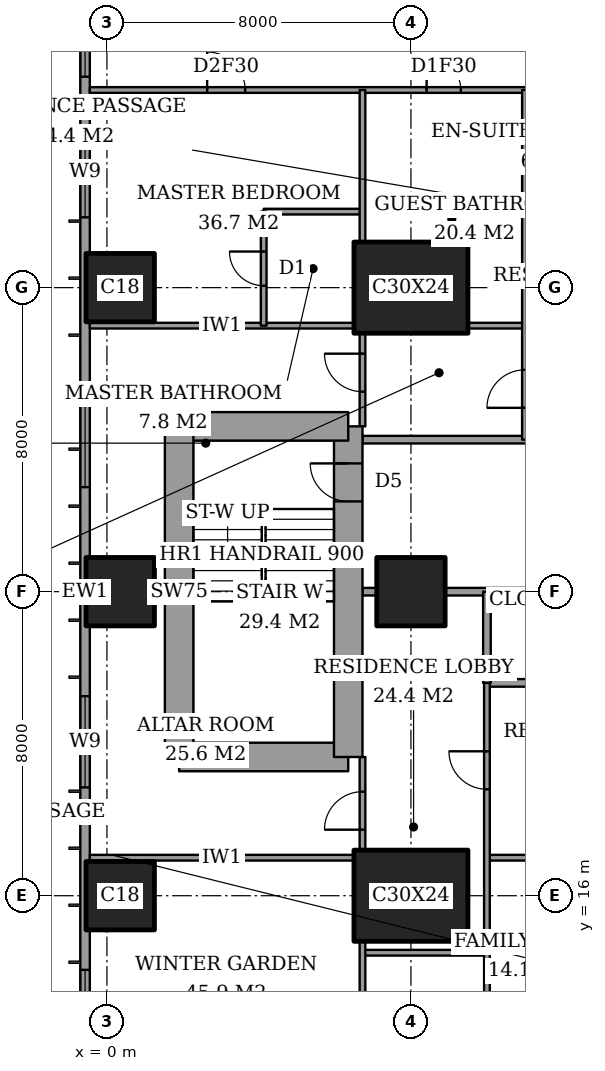
"""IFC4 building model, lengths in metres.
Left out: names, types, materials, properties, quantities, classifications, styles, units other than length and angle.
Written with IfcOpenShell. Run it as: python <this file> out.ifc"""

import sys

from ifc_helpers import new_model, si_unit, direction, frame, frame_2d, origin, origin_2d, place, context, subcontext, project, spatial, rectangle, extrude, element, fill, save


model = new_model("IFC4")
c1 = context("Model", 3, precision=1e-05, world=origin(), true_north=direction((0.0, 1.0)))
c2 = subcontext(c1, "Body", "Model", "MODEL_VIEW")
j1 = project(units=[si_unit("LENGTHUNIT", "METRE"), si_unit("PLANEANGLEUNIT", "RADIAN")], contexts=[c1])
p1 = place(None, origin())
s1 = spatial("IfcSite", under=j1, at=p1, CompositionType="ELEMENT")
p2 = place(p1, origin())
s2 = spatial("IfcBuilding", under=s1, at=p2, CompositionType="ELEMENT")
p3 = place(p2, frame((0.0, 0.0, 203.8)))
s3 = spatial("IfcBuildingStorey", under=s2, at=p3, CompositionType="ELEMENT", Elevation=203.8)
for number, where, z_axis, x_axis in (
    (1, (0.35, 16.0, 0.0), (0.0, 0.0, 1.0), (1.0, 0.0, 0.0)),
    (2, (0.35, 24.0, 0.0), (0.0, 0.0, 1.0), (1.0, 0.0, 0.0)),
    (3, (0.35, 32.0, 0.0), (0.0, 0.0, 1.0), (1.0, 0.0, 0.0)),
):
    element("IfcColumn", number, at=place(p3, frame(where, z_axis=z_axis, x_axis=x_axis)), inside=s3, PredefinedType="COLUMN", context=c2, shape_type="SweptSolid", body=[
        extrude(rectangle(XDim=1.8, YDim=1.8, at=origin_2d()), origin(), (0.0, 0.0, 1.0), 3.6),
    ])
p4 = place(p3, frame((8.0, 16.0, 0.0), z_axis=(0.0, 0.0, 1.0), x_axis=(1.0, 0.0, 0.0)))
e4 = element("IfcColumn", 4, at=p4, inside=s3, PredefinedType="COLUMN", context=c2, shape_type="SweptSolid", body=[
    extrude(rectangle(XDim=3.0, YDim=2.4, at=origin_2d()), origin(), (0.0, 0.0, 1.0), 3.6),
])
p5 = place(p3, frame((8.0, 24.0, 0.0), z_axis=(0.0, 0.0, 1.0), x_axis=(1.0, 0.0, 0.0)))
e5 = element("IfcColumn", 5, at=p5, inside=s3, PredefinedType="COLUMN", context=c2, shape_type="SweptSolid", body=[
    extrude(rectangle(XDim=1.8, YDim=1.8, at=origin_2d()), origin(), (0.0, 0.0, 1.0), 3.6),
])
p6 = place(p3, frame((8.0, 32.0, 0.0), z_axis=(0.0, 0.0, 1.0), x_axis=(1.0, 0.0, 0.0)))
e6 = element("IfcColumn", 6, at=p6, inside=s3, PredefinedType="COLUMN", context=c2, shape_type="SweptSolid", body=[
    extrude(rectangle(XDim=3.0, YDim=2.4, at=origin_2d()), origin(), (0.0, 0.0, 1.0), 3.6),
])
p7 = place(p3, frame((1.9, 19.65, 0.0), z_axis=(0.0, 0.0, 1.0), x_axis=(1.0, 0.0, 0.0)))
e7 = element("IfcWall", 7, at=p7, inside=s3, PredefinedType="SHEAR", context=c2, shape_type="SweptSolid", body=[
    extrude(rectangle(XDim=4.45, YDim=0.75, at=frame_2d((2.225, 0.0))), origin(), (0.0, 0.0, 1.0), 3.6),
])
p8 = place(p3, frame((6.35, 19.65, 0.0), z_axis=(0.0, 0.0, 1.0), x_axis=(0.0, 1.0, 0.0)))
e8 = element("IfcWall", 8, at=p8, inside=s3, PredefinedType="SHEAR", context=c2, shape_type="SweptSolid", body=[
    extrude(rectangle(XDim=8.7, YDim=0.75, at=frame_2d((4.35, 0.0))), origin(), (0.0, 0.0, 1.0), 3.6),
])
p9 = place(p8, frame((6.725, 0.0, 0.0)))
e9 = element("IfcOpeningElement", 9, at=p9, cuts=e8, PredefinedType="OPENING", context=c2, shape_type="SweptSolid", body=[
    extrude(rectangle(XDim=1.0, YDim=2.1, at=frame_2d((0.5, 1.05))), frame((0.0, 0.385, 0.0), z_axis=(0.0, -1.0, 0.0), x_axis=(1.0, 0.0, 0.0)), (0.0, 0.0, 1.0), 0.77),
])
p10 = place(p3, frame((6.35, 28.35, 0.0), z_axis=(0.0, 0.0, 1.0), x_axis=(-1.0, 0.0, 0.0)))
e10 = element("IfcWall", 10, at=p10, inside=s3, PredefinedType="SHEAR", context=c2, shape_type="SweptSolid", body=[
    extrude(rectangle(XDim=4.45, YDim=0.75, at=frame_2d((2.225, 0.0))), origin(), (0.0, 0.0, 1.0), 3.6),
])
p11 = place(p3, frame((1.9, 28.35, 0.0), z_axis=(0.0, 0.0, 1.0), x_axis=(0.0, -1.0, 0.0)))
e11 = element("IfcWall", 11, at=p11, inside=s3, PredefinedType="SHEAR", context=c2, shape_type="SweptSolid", body=[
    extrude(rectangle(XDim=8.7, YDim=0.75, at=frame_2d((4.35, 0.0))), origin(), (0.0, 0.0, 1.0), 3.6),
])
p12 = place(p3, frame((-0.575, 44.825, 0.0), z_axis=(0.0, 0.0, 1.0), x_axis=(0.0, -1.0, 0.0)))
e12 = element("IfcWall", 12, at=p12, inside=s3, PredefinedType="SOLIDWALL", context=c2, shape_type="SweptSolid", body=[
    extrude(rectangle(XDim=41.65, YDim=0.25, at=frame_2d((20.825, 0.0))), origin(), (0.0, 0.0, 1.0), 3.6),
])
p13 = place(p12, frame((0.825, 0.0, 0.2)))
e13 = element("IfcOpeningElement", 13, at=p13, cuts=e12, PredefinedType="OPENING", context=c2, shape_type="SweptSolid", body=[
    extrude(rectangle(XDim=2.4, YDim=2.4, at=frame_2d((1.2, 1.2))), frame((0.0, 0.135, 0.0), z_axis=(0.0, -1.0, 0.0), x_axis=(1.0, 0.0, 0.0)), (0.0, 0.0, 1.0), 0.27),
])
p14 = place(p12, frame((6.075, 0.0, 0.2)))
e14 = element("IfcOpeningElement", 14, at=p14, cuts=e12, PredefinedType="OPENING", context=c2, shape_type="SweptSolid", body=[
    extrude(rectangle(XDim=1.2, YDim=2.4, at=frame_2d((0.6, 1.2))), frame((0.0, 0.135, 0.0), z_axis=(0.0, -1.0, 0.0), x_axis=(1.0, 0.0, 0.0)), (0.0, 0.0, 1.0), 0.27),
])
p15 = place(p12, frame((8.575, 0.0, 0.2)))
e15 = element("IfcOpeningElement", 15, at=p15, cuts=e12, PredefinedType="OPENING", context=c2, shape_type="SweptSolid", body=[
    extrude(rectangle(XDim=2.4, YDim=2.4, at=frame_2d((1.2, 1.2))), frame((0.0, 0.135, 0.0), z_axis=(0.0, -1.0, 0.0), x_axis=(1.0, 0.0, 0.0)), (0.0, 0.0, 1.0), 0.27),
])
p16 = place(p12, frame((15.675, 0.0, 0.2)))
e16 = element("IfcOpeningElement", 16, at=p16, cuts=e12, PredefinedType="OPENING", context=c2, shape_type="SweptSolid", body=[
    extrude(rectangle(XDim=2.4, YDim=2.4, at=frame_2d((1.2, 1.2))), frame((0.0, 0.135, 0.0), z_axis=(0.0, -1.0, 0.0), x_axis=(1.0, 0.0, 0.0)), (0.0, 0.0, 1.0), 0.27),
])
p17 = place(p12, frame((23.575, 0.0, 0.2)))
e17 = element("IfcOpeningElement", 17, at=p17, cuts=e12, PredefinedType="OPENING", context=c2, shape_type="SweptSolid", body=[
    extrude(rectangle(XDim=2.4, YDim=2.4, at=frame_2d((1.2, 1.2))), frame((0.0, 0.135, 0.0), z_axis=(0.0, -1.0, 0.0), x_axis=(1.0, 0.0, 0.0)), (0.0, 0.0, 1.0), 0.27),
])
p18 = place(p12, frame((30.775, 0.0, 0.2)))
e18 = element("IfcOpeningElement", 18, at=p18, cuts=e12, PredefinedType="OPENING", context=c2, shape_type="SweptSolid", body=[
    extrude(rectangle(XDim=2.4, YDim=2.4, at=frame_2d((1.2, 1.2))), frame((0.0, 0.135, 0.0), z_axis=(0.0, -1.0, 0.0), x_axis=(1.0, 0.0, 0.0)), (0.0, 0.0, 1.0), 0.27),
])
p19 = place(p12, frame((34.55, 0.0, 0.2)))
e19 = element("IfcOpeningElement", 19, at=p19, cuts=e12, PredefinedType="OPENING", context=c2, shape_type="SweptSolid", body=[
    extrude(rectangle(XDim=1.2, YDim=2.4, at=frame_2d((0.6, 1.2))), frame((0.0, 0.135, 0.0), z_axis=(0.0, -1.0, 0.0), x_axis=(1.0, 0.0, 0.0)), (0.0, 0.0, 1.0), 0.27),
])
p20 = place(p12, frame((38.425, 0.0, 0.2)))
e20 = element("IfcOpeningElement", 20, at=p20, cuts=e12, PredefinedType="OPENING", context=c2, shape_type="SweptSolid", body=[
    extrude(rectangle(XDim=2.4, YDim=2.4, at=frame_2d((1.2, 1.2))), frame((0.0, 0.135, 0.0), z_axis=(0.0, -1.0, 0.0), x_axis=(1.0, 0.0, 0.0)), (0.0, 0.0, 1.0), 0.27),
])
p21 = place(p3, frame((6.725, 14.5, 0.0), z_axis=(0.0, 0.0, 1.0), x_axis=(1.0, 0.0, 0.0)))
e21 = element("IfcWall", 21, at=p21, inside=s3, PredefinedType="PARTITIONING", context=c2, shape_type="SweptSolid", body=[
    extrude(rectangle(XDim=3.275, YDim=0.15, at=frame_2d((1.637, 0.0))), origin(), (0.0, 0.0, 1.0), 3.35),
])
p22 = place(p3, frame((-0.45, 17.0, 0.0), z_axis=(0.0, 0.0, 1.0), x_axis=(1.0, 0.0, 0.0)))
e22 = element("IfcWall", 22, at=p22, inside=s3, PredefinedType="PARTITIONING", context=c2, shape_type="SweptSolid", body=[
    extrude(rectangle(XDim=6.95, YDim=0.15, at=frame_2d((3.475, 0.0))), origin(), (0.0, 0.0, 1.0), 3.35),
])
p23 = place(p3, frame((10.0, 17.0, 0.0), z_axis=(0.0, 0.0, 1.0), x_axis=(1.0, 0.0, 0.0)))
e23 = element("IfcWall", 23, at=p23, inside=s3, PredefinedType="PARTITIONING", context=c2, shape_type="SweptSolid", body=[
    extrude(rectangle(XDim=4.4, YDim=0.15, at=frame_2d((2.2, 0.0))), origin(), (0.0, 0.0, 1.0), 3.35),
])
p24 = place(p23, frame((2.8, 0.0, 0.0)))
e24 = element("IfcOpeningElement", 24, at=p24, cuts=e23, PredefinedType="OPENING", context=c2, shape_type="SweptSolid", body=[
    extrude(rectangle(XDim=1.0, YDim=2.1, at=frame_2d((0.5, 1.05))), frame((0.0, 0.085, 0.0), z_axis=(0.0, -1.0, 0.0), x_axis=(1.0, 0.0, 0.0)), (0.0, 0.0, 1.0), 0.17),
])
p25 = place(p3, frame((10.0, 21.6, 0.0), z_axis=(0.0, 0.0, 1.0), x_axis=(1.0, 0.0, 0.0)))
e25 = element("IfcWall", 25, at=p25, inside=s3, PredefinedType="PARTITIONING", context=c2, shape_type="SweptSolid", body=[
    extrude(rectangle(XDim=4.8, YDim=0.2, at=frame_2d((2.4, 0.0))), origin(), (0.0, 0.0, 1.0), 3.35),
])
p26 = place(p25, frame((1.95, 0.0, 0.0)))
e26 = element("IfcOpeningElement", 26, at=p26, cuts=e25, PredefinedType="OPENING", context=c2, shape_type="SweptSolid", body=[
    extrude(rectangle(XDim=0.9, YDim=2.1, at=frame_2d((0.45, 1.05))), frame((0.0, 0.11, 0.0), z_axis=(0.0, -1.0, 0.0), x_axis=(1.0, 0.0, 0.0)), (0.0, 0.0, 1.0), 0.22),
])
p27 = place(p3, frame((6.725, 24.0, 0.0), z_axis=(0.0, 0.0, 1.0), x_axis=(1.0, 0.0, 0.0)))
e27 = element("IfcWall", 27, at=p27, inside=s3, PredefinedType="PARTITIONING", context=c2, shape_type="SweptSolid", body=[
    extrude(rectangle(XDim=0.375, YDim=0.2, at=frame_2d((0.188, 0.0))), origin(), (0.0, 0.0, 1.0), 3.35),
])
p28 = place(p3, frame((8.9, 24.0, 0.0), z_axis=(0.0, 0.0, 1.0), x_axis=(1.0, 0.0, 0.0)))
e28 = element("IfcWall", 28, at=p28, inside=s3, PredefinedType="PARTITIONING", context=c2, shape_type="SweptSolid", body=[
    extrude(rectangle(XDim=6.2, YDim=0.2, at=frame_2d((3.1, 0.0))), origin(), (0.0, 0.0, 1.0), 3.35),
])
p29 = place(p3, frame((6.725, 28.0, 0.0), z_axis=(0.0, 0.0, 1.0), x_axis=(1.0, 0.0, 0.0)))
e29 = element("IfcWall", 29, at=p29, inside=s3, PredefinedType="PARTITIONING", context=c2, shape_type="SweptSolid", body=[
    extrude(rectangle(XDim=17.275, YDim=0.2, at=frame_2d((8.637, 0.0))), origin(), (0.0, 0.0, 1.0), 3.35),
])
p30 = place(p29, frame((7.175, 0.0, 0.0)))
e30 = element("IfcOpeningElement", 30, at=p30, cuts=e29, PredefinedType="OPENING", context=c2, shape_type="SweptSolid", body=[
    extrude(rectangle(XDim=1.2, YDim=2.4, at=frame_2d((0.6, 1.2))), frame((0.0, 0.11, 0.0), z_axis=(0.0, -1.0, 0.0), x_axis=(1.0, 0.0, 0.0)), (0.0, 0.0, 1.0), 0.22),
])
p31 = place(p3, frame((-0.45, 31.0, 0.0), z_axis=(0.0, 0.0, 1.0), x_axis=(1.0, 0.0, 0.0)))
e31 = element("IfcWall", 31, at=p31, inside=s3, PredefinedType="PARTITIONING", context=c2, shape_type="SweptSolid", body=[
    extrude(rectangle(XDim=6.95, YDim=0.15, at=frame_2d((3.475, 0.0))), origin(), (0.0, 0.0, 1.0), 3.35),
])
p32 = place(p3, frame((9.5, 31.0, 0.0), z_axis=(0.0, 0.0, 1.0), x_axis=(1.0, 0.0, 0.0)))
e32 = element("IfcWall", 32, at=p32, inside=s3, PredefinedType="PARTITIONING", context=c2, shape_type="SweptSolid", body=[
    extrude(rectangle(XDim=1.5, YDim=0.15, at=frame_2d((0.75, 0.0))), origin(), (0.0, 0.0, 1.0), 3.35),
])
p33 = place(p3, frame((4.125, 34.0, 0.0), z_axis=(0.0, 0.0, 1.0), x_axis=(1.0, 0.0, 0.0)))
e33 = element("IfcWall", 33, at=p33, inside=s3, PredefinedType="PARTITIONING", context=c2, shape_type="SweptSolid", body=[
    extrude(rectangle(XDim=2.6, YDim=0.15, at=frame_2d((1.3, 0.0))), origin(), (0.0, 0.0, 1.0), 3.35),
])
p34 = place(p3, frame((-0.45, 37.2, 0.0), z_axis=(0.0, 0.0, 1.0), x_axis=(1.0, 0.0, 0.0)))
e34 = element("IfcWall", 34, at=p34, inside=s3, PredefinedType="PARTITIONING", context=c2, shape_type="SweptSolid", body=[
    extrude(rectangle(XDim=25.011, YDim=0.15, at=frame_2d((12.505, 0.0))), origin(), (0.0, 0.0, 1.0), 3.35),
])
p35 = place(p34, frame((12.05, 0.0, 0.0)))
e35 = element("IfcOpeningElement", 35, at=p35, cuts=e34, PredefinedType="OPENING", context=c2, shape_type="SweptSolid", body=[
    extrude(rectangle(XDim=1.0, YDim=2.1, at=frame_2d((0.5, 1.05))), frame((0.0, 0.085, 0.0), z_axis=(0.0, -1.0, 0.0), x_axis=(1.0, 0.0, 0.0)), (0.0, 0.0, 1.0), 0.17),
])
p36 = place(p34, frame((3.087, 0.0, 0.0)))
e36 = element("IfcOpeningElement", 36, at=p36, cuts=e34, PredefinedType="OPENING", context=c2, shape_type="SweptSolid", body=[
    extrude(rectangle(XDim=1.0, YDim=2.1, at=frame_2d((0.5, 1.05))), frame((0.0, 0.085, 0.0), z_axis=(0.0, -1.0, 0.0), x_axis=(1.0, 0.0, 0.0)), (0.0, 0.0, 1.0), 0.17),
])
p37 = place(p34, frame((8.863, 0.0, 0.0)))
e37 = element("IfcOpeningElement", 37, at=p37, cuts=e34, PredefinedType="OPENING", context=c2, shape_type="SweptSolid", body=[
    extrude(rectangle(XDim=0.9, YDim=2.1, at=frame_2d((0.45, 1.05))), frame((0.0, 0.085, 0.0), z_axis=(0.0, -1.0, 0.0), x_axis=(1.0, 0.0, 0.0)), (0.0, 0.0, 1.0), 0.17),
])
p38 = place(p34, frame((15.55, 0.0, 0.0)))
e38 = element("IfcOpeningElement", 38, at=p38, cuts=e34, PredefinedType="OPENING", context=c2, shape_type="SweptSolid", body=[
    extrude(rectangle(XDim=1.0, YDim=2.1, at=frame_2d((0.5, 1.05))), frame((0.0, 0.085, 0.0), z_axis=(0.0, -1.0, 0.0), x_axis=(1.0, 0.0, 0.0)), (0.0, 0.0, 1.0), 0.17),
])
p39 = place(p34, frame((21.175, 0.0, 0.0)))
e39 = element("IfcOpeningElement", 39, at=p39, cuts=e34, PredefinedType="OPENING", context=c2, shape_type="SweptSolid", body=[
    extrude(rectangle(XDim=1.0, YDim=2.1, at=frame_2d((0.5, 1.05))), frame((0.0, 0.085, 0.0), z_axis=(0.0, -1.0, 0.0), x_axis=(1.0, 0.0, 0.0)), (0.0, 0.0, 1.0), 0.17),
])
p40 = place(p3, frame((4.125, 31.0, 0.0), z_axis=(0.0, 0.0, 1.0), x_axis=(0.0, 1.0, 0.0)))
e40 = element("IfcWall", 40, at=p40, inside=s3, PredefinedType="PARTITIONING", context=c2, shape_type="SweptSolid", body=[
    extrude(rectangle(XDim=3.0, YDim=0.15, at=frame_2d((1.5, 0.0))), origin(), (0.0, 0.0, 1.0), 3.35),
])
p41 = place(p40, frame((1.05, 0.0, 0.0)))
e41 = element("IfcOpeningElement", 41, at=p41, cuts=e40, PredefinedType="OPENING", context=c2, shape_type="SweptSolid", body=[
    extrude(rectangle(XDim=0.9, YDim=2.1, at=frame_2d((0.45, 1.05))), frame((0.0, 0.085, 0.0), z_axis=(0.0, -1.0, 0.0), x_axis=(1.0, 0.0, 0.0)), (0.0, 0.0, 1.0), 0.17),
])
p42 = place(p3, frame((6.725, 10.6, 0.0), z_axis=(0.0, 0.0, 1.0), x_axis=(0.0, 1.0, 0.0)))
e42 = element("IfcWall", 42, at=p42, inside=s3, PredefinedType="PARTITIONING", context=c2, shape_type="SweptSolid", body=[
    extrude(rectangle(XDim=4.2, YDim=0.15, at=frame_2d((2.1, 0.0))), origin(), (0.0, 0.0, 1.0), 3.35),
])
p43 = place(p3, frame((6.725, 17.2, 0.0), z_axis=(0.0, 0.0, 1.0), x_axis=(0.0, 1.0, 0.0)))
e43 = element("IfcWall", 43, at=p43, inside=s3, PredefinedType="PARTITIONING", context=c2, shape_type="SweptSolid", body=[
    extrude(rectangle(XDim=2.45, YDim=0.15, at=frame_2d((1.225, 0.0))), origin(), (0.0, 0.0, 1.0), 3.35),
])
p44 = place(p43, frame((0.538, 0.0, 0.0)))
e44 = element("IfcOpeningElement", 44, at=p44, cuts=e43, PredefinedType="OPENING", context=c2, shape_type="SweptSolid", body=[
    extrude(rectangle(XDim=1.0, YDim=2.1, at=frame_2d((0.5, 1.05))), frame((0.0, 0.085, 0.0), z_axis=(0.0, -1.0, 0.0), x_axis=(1.0, 0.0, 0.0)), (0.0, 0.0, 1.0), 0.17),
])
p45 = place(p3, frame((6.725, 28.35, 0.0), z_axis=(0.0, 0.0, 1.0), x_axis=(0.0, 1.0, 0.0)))
e45 = element("IfcWall", 45, at=p45, inside=s3, PredefinedType="PARTITIONING", context=c2, shape_type="SweptSolid", body=[
    extrude(rectangle(XDim=2.45, YDim=0.15, at=frame_2d((1.225, 0.0))), origin(), (0.0, 0.0, 1.0), 3.35),
])
p46 = place(p45, frame((0.913, 0.0, 0.0)))
e46 = element("IfcOpeningElement", 46, at=p46, cuts=e45, PredefinedType="OPENING", context=c2, shape_type="SweptSolid", body=[
    extrude(rectangle(XDim=1.0, YDim=2.1, at=frame_2d((0.5, 1.05))), frame((0.0, 0.085, 0.0), z_axis=(0.0, -1.0, 0.0), x_axis=(1.0, 0.0, 0.0)), (0.0, 0.0, 1.0), 0.17),
])
p47 = place(p3, frame((6.725, 33.2, 0.0), z_axis=(0.0, 0.0, 1.0), x_axis=(0.0, 1.0, 0.0)))
e47 = element("IfcWall", 47, at=p47, inside=s3, PredefinedType="PARTITIONING", context=c2, shape_type="SweptSolid", body=[
    extrude(rectangle(XDim=4.0, YDim=0.15, at=frame_2d((2.0, 0.0))), origin(), (0.0, 0.0, 1.0), 3.35),
])
p48 = place(p3, frame((10.0, 21.6, 0.0), z_axis=(0.0, 0.0, 1.0), x_axis=(0.0, 1.0, 0.0)))
e48 = element("IfcWall", 48, at=p48, inside=s3, PredefinedType="PARTITIONING", context=c2, shape_type="SweptSolid", body=[
    extrude(rectangle(XDim=2.4, YDim=0.2, at=frame_2d((1.2, 0.0))), origin(), (0.0, 0.0, 1.0), 3.35),
])
p49 = place(p3, frame((10.0, 10.6, 0.0), z_axis=(0.0, 0.0, 1.0), x_axis=(0.0, 1.0, 0.0)))
e49 = element("IfcWall", 49, at=p49, inside=s3, PredefinedType="PARTITIONING", context=c2, shape_type="SweptSolid", body=[
    extrude(rectangle(XDim=11.0, YDim=0.15, at=frame_2d((5.5, 0.0))), origin(), (0.0, 0.0, 1.0), 3.35),
])
p50 = place(p49, frame((8.2, 0.0, 0.0)))
e50 = element("IfcOpeningElement", 50, at=p50, cuts=e49, PredefinedType="OPENING", context=c2, shape_type="SweptSolid", body=[
    extrude(rectangle(XDim=1.0, YDim=2.1, at=frame_2d((0.5, 1.05))), frame((0.0, 0.085, 0.0), z_axis=(0.0, -1.0, 0.0), x_axis=(1.0, 0.0, 0.0)), (0.0, 0.0, 1.0), 0.17),
])
p51 = place(p3, frame((11.0, 28.0, 0.0), z_axis=(0.0, 0.0, 1.0), x_axis=(0.0, 1.0, 0.0)))
e51 = element("IfcWall", 51, at=p51, inside=s3, PredefinedType="PARTITIONING", context=c2, shape_type="SweptSolid", body=[
    extrude(rectangle(XDim=9.2, YDim=0.15, at=frame_2d((4.6, 0.0))), origin(), (0.0, 0.0, 1.0), 3.35),
])
p52 = place(p51, frame((0.837, 0.0, 0.0)))
e52 = element("IfcOpeningElement", 52, at=p52, cuts=e51, PredefinedType="OPENING", context=c2, shape_type="SweptSolid", body=[
    extrude(rectangle(XDim=1.0, YDim=2.1, at=frame_2d((0.5, 1.05))), frame((0.0, 0.085, 0.0), z_axis=(0.0, -1.0, 0.0), x_axis=(1.0, 0.0, 0.0)), (0.0, 0.0, 1.0), 0.17),
])
p53 = place(p14, origin())
e53 = element("IfcWindow", 53, at=p53, inside=s3, PartitioningType="SINGLE_PANEL", PredefinedType="WINDOW", context=c2, shape_type="SweptSolid", body=[
    extrude(rectangle(XDim=1.2, YDim=2.4, at=frame_2d((0.6, 1.2))), frame((0.0, 0.03, 0.0), z_axis=(0.0, -1.0, 0.0), x_axis=(1.0, 0.0, 0.0)), (0.0, 0.0, 1.0), 0.06),
])
fill(e14, e53)
p54 = place(p15, origin())
e54 = element("IfcWindow", 54, at=p54, inside=s3, PartitioningType="SINGLE_PANEL", PredefinedType="WINDOW", context=c2, shape_type="SweptSolid", body=[
    extrude(rectangle(XDim=2.4, YDim=2.4, at=frame_2d((1.2, 1.2))), frame((0.0, 0.03, 0.0), z_axis=(0.0, -1.0, 0.0), x_axis=(1.0, 0.0, 0.0)), (0.0, 0.0, 1.0), 0.06),
])
fill(e15, e54)
p55 = place(p16, origin())
e55 = element("IfcWindow", 55, at=p55, inside=s3, PartitioningType="SINGLE_PANEL", PredefinedType="WINDOW", context=c2, shape_type="SweptSolid", body=[
    extrude(rectangle(XDim=2.4, YDim=2.4, at=frame_2d((1.2, 1.2))), frame((0.0, 0.03, 0.0), z_axis=(0.0, -1.0, 0.0), x_axis=(1.0, 0.0, 0.0)), (0.0, 0.0, 1.0), 0.06),
])
fill(e16, e55)
p56 = place(p17, origin())
e56 = element("IfcWindow", 56, at=p56, inside=s3, PartitioningType="SINGLE_PANEL", PredefinedType="WINDOW", context=c2, shape_type="SweptSolid", body=[
    extrude(rectangle(XDim=2.4, YDim=2.4, at=frame_2d((1.2, 1.2))), frame((0.0, 0.03, 0.0), z_axis=(0.0, -1.0, 0.0), x_axis=(1.0, 0.0, 0.0)), (0.0, 0.0, 1.0), 0.06),
])
fill(e17, e56)
p57 = place(p18, origin())
e57 = element("IfcWindow", 57, at=p57, inside=s3, PartitioningType="SINGLE_PANEL", PredefinedType="WINDOW", context=c2, shape_type="SweptSolid", body=[
    extrude(rectangle(XDim=2.4, YDim=2.4, at=frame_2d((1.2, 1.2))), frame((0.0, 0.03, 0.0), z_axis=(0.0, -1.0, 0.0), x_axis=(1.0, 0.0, 0.0)), (0.0, 0.0, 1.0), 0.06),
])
fill(e18, e57)
p58 = place(p44, origin())
e58 = element("IfcDoor", 58, at=p58, inside=s3, OperationType="SINGLE_SWING_RIGHT", PredefinedType="DOOR", context=c2, shape_type="SweptSolid", body=[
    extrude(rectangle(XDim=1.0, YDim=2.1, at=frame_2d((0.5, 1.05))), frame((0.0, 0.025, 0.0), z_axis=(0.0, -1.0, 0.0), x_axis=(1.0, 0.0, 0.0)), (0.0, 0.0, 1.0), 0.05),
])
fill(e44, e58)
p59 = place(p50, origin())
e59 = element("IfcDoor", 59, at=p59, inside=s3, OperationType="SINGLE_SWING_LEFT", PredefinedType="DOOR", context=c2, shape_type="SweptSolid", body=[
    extrude(rectangle(XDim=1.0, YDim=2.1, at=frame_2d((0.5, 1.05))), frame((0.0, 0.025, 0.0), z_axis=(0.0, -1.0, 0.0), x_axis=(1.0, 0.0, 0.0)), (0.0, 0.0, 1.0), 0.05),
])
fill(e50, e59)
p60 = place(p41, origin())
e60 = element("IfcDoor", 60, at=p60, inside=s3, OperationType="SINGLE_SWING_LEFT", PredefinedType="DOOR", context=c2, shape_type="SweptSolid", body=[
    extrude(rectangle(XDim=0.9, YDim=2.1, at=frame_2d((0.45, 1.05))), frame((0.0, 0.025, 0.0), z_axis=(0.0, -1.0, 0.0), x_axis=(1.0, 0.0, 0.0)), (0.0, 0.0, 1.0), 0.05),
])
fill(e41, e60)
p61 = place(p36, origin())
e61 = element("IfcDoor", 61, at=p61, inside=s3, OperationType="SINGLE_SWING_RIGHT", PredefinedType="DOOR", context=c2, shape_type="SweptSolid", body=[
    extrude(rectangle(XDim=1.0, YDim=2.1, at=frame_2d((0.5, 1.05))), frame((0.0, 0.025, 0.0), z_axis=(0.0, -1.0, 0.0), x_axis=(1.0, 0.0, 0.0)), (0.0, 0.0, 1.0), 0.05),
])
fill(e36, e61)
p62 = place(p46, origin())
e62 = element("IfcDoor", 62, at=p62, inside=s3, OperationType="SINGLE_SWING_LEFT", PredefinedType="DOOR", context=c2, shape_type="SweptSolid", body=[
    extrude(rectangle(XDim=1.0, YDim=2.1, at=frame_2d((0.5, 1.05))), frame((0.0, 0.025, 0.0), z_axis=(0.0, -1.0, 0.0), x_axis=(1.0, 0.0, 0.0)), (0.0, 0.0, 1.0), 0.05),
])
fill(e46, e62)
p63 = place(p37, origin())
e63 = element("IfcDoor", 63, at=p63, inside=s3, OperationType="SINGLE_SWING_RIGHT", PredefinedType="DOOR", context=c2, shape_type="SweptSolid", body=[
    extrude(rectangle(XDim=0.9, YDim=2.1, at=frame_2d((0.45, 1.05))), frame((0.0, 0.025, 0.0), z_axis=(0.0, -1.0, 0.0), x_axis=(1.0, 0.0, 0.0)), (0.0, 0.0, 1.0), 0.05),
])
fill(e37, e63)
p64 = place(p52, origin())
e64 = element("IfcDoor", 64, at=p64, inside=s3, OperationType="SINGLE_SWING_RIGHT", PredefinedType="DOOR", context=c2, shape_type="SweptSolid", body=[
    extrude(rectangle(XDim=1.0, YDim=2.1, at=frame_2d((0.5, 1.05))), frame((0.0, 0.025, 0.0), z_axis=(0.0, -1.0, 0.0), x_axis=(1.0, 0.0, 0.0)), (0.0, 0.0, 1.0), 0.05),
])
fill(e52, e64)
p65 = place(p9, origin())
e65 = element("IfcDoor", 65, at=p65, inside=s3, OperationType="SINGLE_SWING_LEFT", PredefinedType="DOOR", context=c2, shape_type="SweptSolid", body=[
    extrude(rectangle(XDim=1.0, YDim=2.1, at=frame_2d((0.5, 1.05))), frame((0.0, 0.025, 0.0), z_axis=(0.0, -1.0, 0.0), x_axis=(1.0, 0.0, 0.0)), (0.0, 0.0, 1.0), 0.05),
])
fill(e9, e65)
save(model, sys.argv[1])
